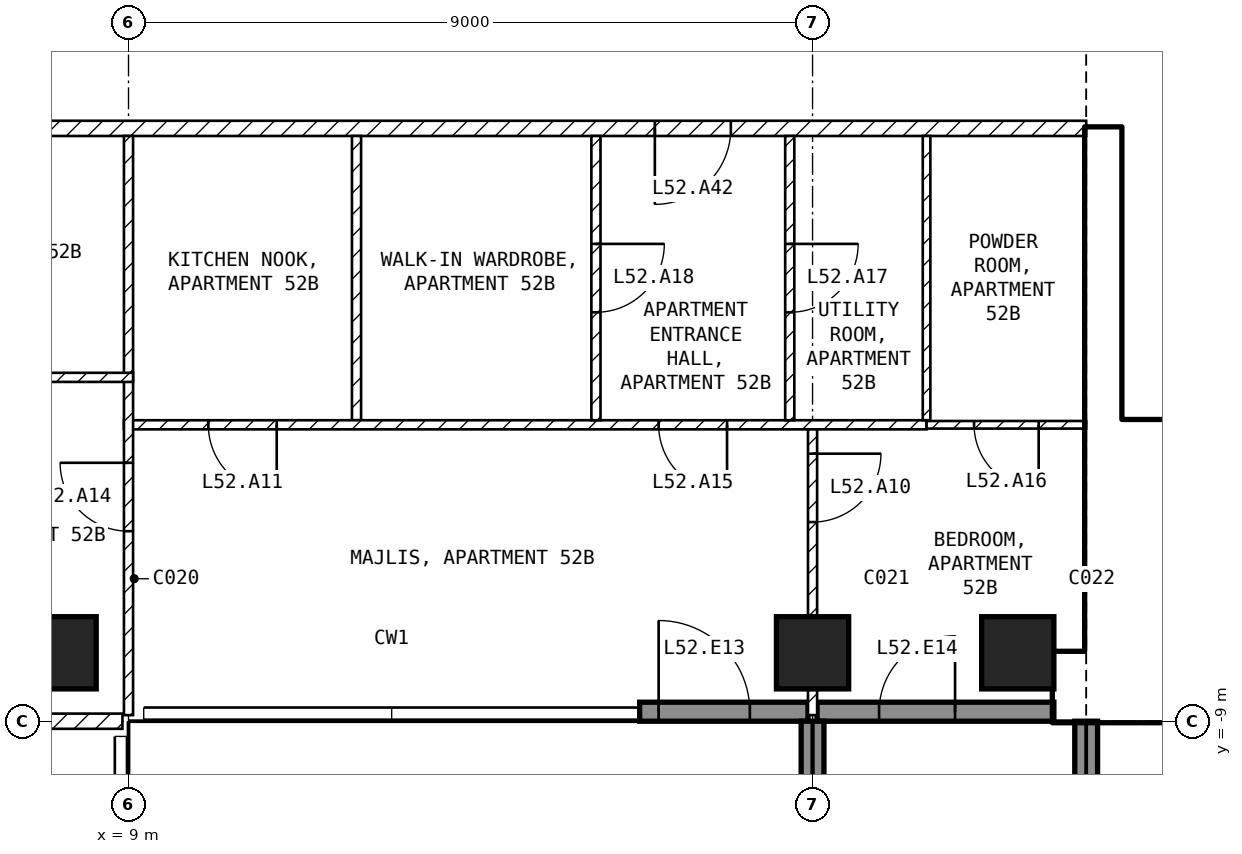
"""IFC4 building model, lengths in metres.
Left out: names, types, materials, properties, quantities, classifications, styles, units other than length and angle.
Written with IfcOpenShell. Run it as: python <this file> out.ifc"""

import sys

from ifc_helpers import new_model, si_unit, direction, frame, frame_2d, origin, origin_2d, place, context, subcontext, project, spatial, rectangle, extrude, element, fill, save


model = new_model("IFC4")
c1 = context("Model", 3, precision=1e-05, world=origin(), true_north=direction((0.0, 1.0)))
c2 = subcontext(c1, "Body", "Model", "MODEL_VIEW")
j1 = project(units=[si_unit("LENGTHUNIT", "METRE"), si_unit("PLANEANGLEUNIT", "RADIAN")], contexts=[c1])
p1 = place(None, origin())
s1 = spatial("IfcSite", under=j1, at=p1, CompositionType="ELEMENT")
p2 = place(p1, origin())
s2 = spatial("IfcBuilding", under=s1, at=p2, CompositionType="ELEMENT")
p3 = place(p2, frame((0.0, 0.0, 208.6)))
s3 = spatial("IfcBuildingStorey", under=s2, at=p3, CompositionType="ELEMENT", Elevation=208.6)
for number, where, z_axis, x_axis in (
    (1, (8.1, -8.1, -0.25), (0.0, 0.0, 1.0), (1.0, 0.0, 0.0)),
    (2, (18.0, -8.1, -0.25), (0.0, 0.0, 1.0), (1.0, 0.0, 0.0)),
    (3, (20.7, -8.1, -0.25), (0.0, 0.0, 1.0), (1.0, 0.0, 0.0)),
):
    element("IfcColumn", number, at=place(p3, frame(where, z_axis=z_axis, x_axis=x_axis)), inside=s3, PredefinedType="COLUMN", context=c2, shape_type="SweptSolid", body=[
        extrude(rectangle(XDim=0.95, YDim=0.95, at=origin_2d()), origin(), (0.0, 0.0, 1.0), 3.5),
    ])
p4 = place(p3, frame((15.725, -8.875, 0.0), z_axis=(0.0, 0.0, 1.0), x_axis=(1.0, 0.0, 0.0)))
e4 = element("IfcWall", 4, at=p4, inside=s3, PredefinedType="SOLIDWALL", context=c2, shape_type="SweptSolid", body=[
    extrude(rectangle(XDim=2.215, YDim=0.25, at=frame_2d((1.107, 0.0))), origin(), (0.0, 0.0, 1.0), 3.25),
])
p5 = place(p4, frame((0.25, 0.0, 0.0)))
e5 = element("IfcOpeningElement", 5, at=p5, cuts=e4, PredefinedType="OPENING", context=c2, shape_type="SweptSolid", body=[
    extrude(rectangle(XDim=1.2, YDim=2.4, at=frame_2d((0.6, 1.2))), frame((0.0, 0.135, 0.0), z_axis=(0.0, -1.0, 0.0), x_axis=(1.0, 0.0, 0.0)), (0.0, 0.0, 1.0), 0.27),
])
p6 = place(p3, frame((18.06, -8.875, 0.0), z_axis=(0.0, 0.0, 1.0), x_axis=(1.0, 0.0, 0.0)))
e6 = element("IfcWall", 6, at=p6, inside=s3, PredefinedType="SOLIDWALL", context=c2, shape_type="SweptSolid", body=[
    extrude(rectangle(XDim=3.115, YDim=0.25, at=frame_2d((1.558, 0.0))), origin(), (0.0, 0.0, 1.0), 3.25),
])
p7 = place(p6, frame((0.815, 0.0, 0.0)))
e7 = element("IfcOpeningElement", 7, at=p7, cuts=e6, PredefinedType="OPENING", context=c2, shape_type="SweptSolid", body=[
    extrude(rectangle(XDim=1.0, YDim=2.4, at=frame_2d((0.5, 1.2))), frame((0.0, 0.135, 0.0), z_axis=(0.0, -1.0, 0.0), x_axis=(1.0, 0.0, 0.0)), (0.0, 0.0, 1.0), 0.27),
])
for number, where, z_axis, x_axis in (
    (8, (18.0, -9.0, 0.0), (0.0, 0.0, 1.0), (0.0, -1.0, 0.0)),
    (9, (21.6, -9.0, 0.0), (0.0, 0.0, 1.0), (0.0, -1.0, 0.0)),
):
    element("IfcWall", number, at=place(p3, frame(where, z_axis=z_axis, x_axis=x_axis)), inside=s3, PredefinedType="SOLIDWALL", context=c2, shape_type="SweptSolid", body=[
        extrude(rectangle(XDim=2.7, YDim=0.3, at=frame_2d((1.35, 0.0))), origin(), (0.0, 0.0, 1.0), 3.25),
    ])
p8 = place(p3, frame((21.175, -8.55, 0.0), z_axis=(0.0, 0.0, 1.0), x_axis=(1.0, 0.0, 0.0)))
e10 = element("IfcWall", 10, at=p8, inside=s3, PredefinedType="SHEAR", context=c2, shape_type="SweptSolid", body=[
    extrude(rectangle(XDim=9.025, YDim=0.9, at=frame_2d((4.512, 0.0))), origin(), (0.0, 0.0, 1.0), 3.25),
])
p9 = place(p3, frame((21.825, -8.1, 0.0), z_axis=(0.0, 0.0, 1.0), x_axis=(0.0, 1.0, 0.0)))
e11 = element("IfcWall", 11, at=p9, inside=s3, PredefinedType="SHEAR", context=c2, shape_type="SweptSolid", body=[
    extrude(rectangle(XDim=6.9, YDim=0.45, at=frame_2d((3.45, 0.0))), origin(), (0.0, 0.0, 1.0), 3.25),
])
p10 = place(p3, frame((22.05, -5.15, 0.0), z_axis=(0.0, 0.0, 1.0), x_axis=(1.0, 0.0, 0.0)))
e12 = element("IfcWall", 12, at=p10, inside=s3, PredefinedType="SOLIDWALL", context=c2, shape_type="SweptSolid", body=[
    extrude(rectangle(XDim=6.3, YDim=0.2, at=frame_2d((3.15, 0.0))), origin(), (0.0, 0.0, 1.0), 3.25),
])
p11 = place(p10, frame((0.2, 0.0, 0.0)))
e13 = element("IfcOpeningElement", 13, at=p11, cuts=e12, PredefinedType="OPENING", context=c2, shape_type="SweptSolid", body=[
    extrude(rectangle(XDim=1.0, YDim=2.1, at=frame_2d((0.5, 1.05))), frame((0.0, 0.11, 0.0), z_axis=(0.0, -1.0, 0.0), x_axis=(1.0, 0.0, 0.0)), (0.0, 0.0, 1.0), 0.22),
])
p12 = place(p3, frame((21.6, -1.2, 0.0), z_axis=(0.0, 0.0, 1.0), x_axis=(-1.0, 0.0, 0.0)))
e14 = element("IfcWall", 14, at=p12, inside=s3, PredefinedType="PARTITIONING", context=c2, shape_type="SweptSolid", body=[
    extrude(rectangle(XDim=17.2, YDim=0.2, at=frame_2d((8.6, 0.0))), origin(), (0.0, 0.0, 1.0), 3.25),
])
p13 = place(p12, frame((4.675, 0.0, 0.0)))
e15 = element("IfcOpeningElement", 15, at=p13, cuts=e14, PredefinedType="OPENING", context=c2, shape_type="SweptSolid", body=[
    extrude(rectangle(XDim=1.0, YDim=2.1, at=frame_2d((0.5, 1.05))), frame((0.0, 0.11, 0.0), z_axis=(0.0, -1.0, 0.0), x_axis=(1.0, 0.0, 0.0)), (0.0, 0.0, 1.0), 0.22),
])
p14 = place(p3, frame((8.92, -9.0, 0.0), z_axis=(0.0, 0.0, 1.0), x_axis=(-1.0, 0.0, 0.0)))
e16 = element("IfcWall", 16, at=p14, inside=s3, PredefinedType="PARTITIONING", context=c2, shape_type="SweptSolid", body=[
    extrude(rectangle(XDim=17.84, YDim=0.2, at=frame_2d((8.92, 0.0))), origin(), (0.0, 0.0, 1.0), 3.25),
])
p15 = place(p14, frame((8.42, 0.0, 0.0)))
e17 = element("IfcOpeningElement", 17, at=p15, cuts=e16, PredefinedType="OPENING", context=c2, shape_type="SweptSolid", body=[
    extrude(rectangle(XDim=1.0, YDim=2.1, at=frame_2d((0.5, 1.05))), frame((0.0, 0.11, 0.0), z_axis=(0.0, -1.0, 0.0), x_axis=(1.0, 0.0, 0.0)), (0.0, 0.0, 1.0), 0.22),
])
p16 = place(p3, frame((12.0, -1.3, 0.0), z_axis=(0.0, 0.0, 1.0), x_axis=(0.0, -1.0, 0.0)))
e18 = element("IfcWall", 18, at=p16, inside=s3, PredefinedType="PARTITIONING", context=c2, shape_type="SweptSolid", body=[
    extrude(rectangle(XDim=3.74, YDim=0.12, at=frame_2d((1.87, 0.0))), origin(), (0.0, 0.0, 1.0), 3.25),
])
p17 = place(p3, frame((19.5, -5.1, 0.0), z_axis=(0.0, 0.0, 1.0), x_axis=(-1.0, 0.0, 0.0)))
e19 = element("IfcWall", 19, at=p17, inside=s3, PredefinedType="PARTITIONING", context=c2, shape_type="SweptSolid", body=[
    extrude(rectangle(XDim=10.56, YDim=0.12, at=frame_2d((5.28, 0.0))), origin(), (0.0, 0.0, 1.0), 3.25),
])
p18 = place(p17, frame((8.55, 0.0, 0.0)))
e20 = element("IfcOpeningElement", 20, at=p18, cuts=e19, PredefinedType="OPENING", context=c2, shape_type="SweptSolid", body=[
    extrude(rectangle(XDim=0.9, YDim=2.1, at=frame_2d((0.45, 1.05))), frame((0.0, 0.07, 0.0), z_axis=(0.0, -1.0, 0.0), x_axis=(1.0, 0.0, 0.0)), (0.0, 0.0, 1.0), 0.14),
])
p19 = place(p17, frame((2.625, 0.0, 0.0)))
e21 = element("IfcOpeningElement", 21, at=p19, cuts=e19, PredefinedType="OPENING", context=c2, shape_type="SweptSolid", body=[
    extrude(rectangle(XDim=0.9, YDim=2.1, at=frame_2d((0.45, 1.05))), frame((0.0, 0.07, 0.0), z_axis=(0.0, -1.0, 0.0), x_axis=(1.0, 0.0, 0.0)), (0.0, 0.0, 1.0), 0.14),
])
p20 = place(p3, frame((9.0, -8.92, 0.0), z_axis=(0.0, 0.0, 1.0), x_axis=(0.0, 1.0, 0.0)))
e22 = element("IfcWall", 22, at=p20, inside=s3, PredefinedType="PARTITIONING", context=c2, shape_type="SweptSolid", body=[
    extrude(rectangle(XDim=7.62, YDim=0.12, at=frame_2d((3.81, 0.0))), origin(), (0.0, 0.0, 1.0), 3.25),
])
p21 = place(p20, frame((2.42, 0.0, 0.0)))
e23 = element("IfcOpeningElement", 23, at=p21, cuts=e22, PredefinedType="OPENING", context=c2, shape_type="SweptSolid", body=[
    extrude(rectangle(XDim=0.9, YDim=2.1, at=frame_2d((0.45, 1.05))), frame((0.0, 0.07, 0.0), z_axis=(0.0, -1.0, 0.0), x_axis=(1.0, 0.0, 0.0)), (0.0, 0.0, 1.0), 0.14),
])
p22 = place(p3, frame((15.15, -1.3, 0.0), z_axis=(0.0, 0.0, 1.0), x_axis=(0.0, -1.0, 0.0)))
e24 = element("IfcWall", 24, at=p22, inside=s3, PredefinedType="PARTITIONING", context=c2, shape_type="SweptSolid", body=[
    extrude(rectangle(XDim=3.74, YDim=0.12, at=frame_2d((1.87, 0.0))), origin(), (0.0, 0.0, 1.0), 3.25),
])
p23 = place(p22, frame((1.42, 0.0, 0.0)))
e25 = element("IfcOpeningElement", 25, at=p23, cuts=e24, PredefinedType="OPENING", context=c2, shape_type="SweptSolid", body=[
    extrude(rectangle(XDim=0.9, YDim=2.1, at=frame_2d((0.45, 1.05))), frame((0.0, 0.07, 0.0), z_axis=(0.0, -1.0, 0.0), x_axis=(1.0, 0.0, 0.0)), (0.0, 0.0, 1.0), 0.14),
])
p24 = place(p3, frame((17.7, -1.3, 0.0), z_axis=(0.0, 0.0, 1.0), x_axis=(0.0, -1.0, 0.0)))
e26 = element("IfcWall", 26, at=p24, inside=s3, PredefinedType="PARTITIONING", context=c2, shape_type="SweptSolid", body=[
    extrude(rectangle(XDim=3.74, YDim=0.12, at=frame_2d((1.87, 0.0))), origin(), (0.0, 0.0, 1.0), 3.25),
])
p25 = place(p24, frame((1.42, 0.0, 0.0)))
e27 = element("IfcOpeningElement", 27, at=p25, cuts=e26, PredefinedType="OPENING", context=c2, shape_type="SweptSolid", body=[
    extrude(rectangle(XDim=0.9, YDim=2.1, at=frame_2d((0.45, 1.05))), frame((0.0, 0.07, 0.0), z_axis=(0.0, -1.0, 0.0), x_axis=(1.0, 0.0, 0.0)), (0.0, 0.0, 1.0), 0.14),
])
p26 = place(p3, frame((19.5, -1.3, 0.0), z_axis=(0.0, 0.0, 1.0), x_axis=(0.0, -1.0, 0.0)))
e28 = element("IfcWall", 28, at=p26, inside=s3, PredefinedType="PARTITIONING", context=c2, shape_type="SweptSolid", body=[
    extrude(rectangle(XDim=3.74, YDim=0.1, at=frame_2d((1.87, 0.0))), origin(), (0.0, 0.0, 1.0), 3.25),
])
p27 = place(p3, frame((21.6, -5.1, 0.0), z_axis=(0.0, 0.0, 1.0), x_axis=(-1.0, 0.0, 0.0)))
e29 = element("IfcWall", 29, at=p27, inside=s3, PredefinedType="PARTITIONING", context=c2, shape_type="SweptSolid", body=[
    extrude(rectangle(XDim=2.1, YDim=0.1, at=frame_2d((1.05, 0.0))), origin(), (0.0, 0.0, 1.0), 3.25),
])
p28 = place(p27, frame((0.625, 0.0, 0.0)))
e30 = element("IfcOpeningElement", 30, at=p28, cuts=e29, PredefinedType="OPENING", context=c2, shape_type="SweptSolid", body=[
    extrude(rectangle(XDim=0.85, YDim=2.1, at=frame_2d((0.425, 1.05))), frame((0.0, 0.06, 0.0), z_axis=(0.0, -1.0, 0.0), x_axis=(1.0, 0.0, 0.0)), (0.0, 0.0, 1.0), 0.12),
])
p29 = place(p3, frame((18.0, -5.16, 0.0), z_axis=(0.0, 0.0, 1.0), x_axis=(0.0, -1.0, 0.0)))
e31 = element("IfcWall", 31, at=p29, inside=s3, PredefinedType="PARTITIONING", context=c2, shape_type="SweptSolid", body=[
    extrude(rectangle(XDim=3.76, YDim=0.12, at=frame_2d((1.88, 0.0))), origin(), (0.0, 0.0, 1.0), 2.48),
])
p30 = place(p29, frame((0.32, 0.0, 0.0)))
e32 = element("IfcOpeningElement", 32, at=p30, cuts=e31, PredefinedType="OPENING", context=c2, shape_type="SweptSolid", body=[
    extrude(rectangle(XDim=0.9, YDim=2.1, at=frame_2d((0.45, 1.05))), frame((0.0, 0.07, 0.0), z_axis=(0.0, -1.0, 0.0), x_axis=(1.0, 0.0, 0.0)), (0.0, 0.0, 1.0), 0.14),
])
p31 = place(p3, frame((9.06, -4.476, 0.0), z_axis=(0.0, 0.0, 1.0), x_axis=(-1.0, 0.0, 0.0)))
e33 = element("IfcWall", 33, at=p31, inside=s3, PredefinedType="PARTITIONING", context=c2, shape_type="SweptSolid", body=[
    extrude(rectangle(XDim=4.66, YDim=0.12, at=frame_2d((2.33, 0.0))), origin(), (0.0, 0.0, 1.0), 3.25),
])
p32 = place(p31, frame((1.86, 0.0, 0.0)))
e34 = element("IfcOpeningElement", 34, at=p32, cuts=e33, PredefinedType="OPENING", context=c2, shape_type="SweptSolid", body=[
    extrude(rectangle(XDim=0.9, YDim=2.1, at=frame_2d((0.45, 1.05))), frame((0.0, 0.07, 0.0), z_axis=(0.0, -1.0, 0.0), x_axis=(1.0, 0.0, 0.0)), (0.0, 0.0, 1.0), 0.14),
])
p33 = place(p5, origin())
e35 = element("IfcDoor", 35, at=p33, inside=s3, OperationType="SINGLE_SWING_LEFT", PredefinedType="DOOR", context=c2, shape_type="SweptSolid", body=[
    extrude(rectangle(XDim=1.2, YDim=2.4, at=frame_2d((0.6, 1.2))), frame((0.0, 0.025, 0.0), z_axis=(0.0, -1.0, 0.0), x_axis=(1.0, 0.0, 0.0)), (0.0, 0.0, 1.0), 0.05),
])
fill(e5, e35)
p34 = place(p7, origin())
e36 = element("IfcDoor", 36, at=p34, inside=s3, OperationType="SINGLE_SWING_RIGHT", PredefinedType="DOOR", context=c2, shape_type="SweptSolid", body=[
    extrude(rectangle(XDim=1.0, YDim=2.4, at=frame_2d((0.5, 1.2))), frame((0.0, 0.025, 0.0), z_axis=(0.0, -1.0, 0.0), x_axis=(1.0, 0.0, 0.0)), (0.0, 0.0, 1.0), 0.05),
])
fill(e7, e36)
p35 = place(p11, origin())
e37 = element("IfcDoor", 37, at=p35, inside=s3, OperationType="SINGLE_SWING_LEFT", PredefinedType="DOOR", context=c2, shape_type="SweptSolid", body=[
    extrude(rectangle(XDim=1.0, YDim=2.1, at=frame_2d((0.5, 1.05))), frame((0.0, 0.025, 0.0), z_axis=(0.0, -1.0, 0.0), x_axis=(1.0, 0.0, 0.0)), (0.0, 0.0, 1.0), 0.05),
])
fill(e13, e37)
p36 = place(p30, origin())
e38 = element("IfcDoor", 38, at=p36, inside=s3, OperationType="SINGLE_SWING_LEFT", PredefinedType="DOOR", context=c2, shape_type="SweptSolid", body=[
    extrude(rectangle(XDim=0.9, YDim=2.1, at=frame_2d((0.45, 1.05))), frame((0.0, 0.025, 0.0), z_axis=(0.0, -1.0, 0.0), x_axis=(1.0, 0.0, 0.0)), (0.0, 0.0, 1.0), 0.05),
])
fill(e32, e38)
p37 = place(p18, origin())
e39 = element("IfcDoor", 39, at=p37, inside=s3, OperationType="SINGLE_SWING_LEFT", PredefinedType="DOOR", context=c2, shape_type="SweptSolid", body=[
    extrude(rectangle(XDim=0.9, YDim=2.1, at=frame_2d((0.45, 1.05))), frame((0.0, 0.025, 0.0), z_axis=(0.0, -1.0, 0.0), x_axis=(1.0, 0.0, 0.0)), (0.0, 0.0, 1.0), 0.05),
])
fill(e20, e39)
p38 = place(p21, origin())
e40 = element("IfcDoor", 40, at=p38, inside=s3, OperationType="SINGLE_SWING_RIGHT", PredefinedType="DOOR", context=c2, shape_type="SweptSolid", body=[
    extrude(rectangle(XDim=0.9, YDim=2.1, at=frame_2d((0.45, 1.05))), frame((0.0, 0.025, 0.0), z_axis=(0.0, -1.0, 0.0), x_axis=(1.0, 0.0, 0.0)), (0.0, 0.0, 1.0), 0.05),
])
fill(e23, e40)
p39 = place(p19, origin())
e41 = element("IfcDoor", 41, at=p39, inside=s3, OperationType="SINGLE_SWING_LEFT", PredefinedType="DOOR", context=c2, shape_type="SweptSolid", body=[
    extrude(rectangle(XDim=0.9, YDim=2.1, at=frame_2d((0.45, 1.05))), frame((0.0, 0.025, 0.0), z_axis=(0.0, -1.0, 0.0), x_axis=(1.0, 0.0, 0.0)), (0.0, 0.0, 1.0), 0.05),
])
fill(e21, e41)
p40 = place(p28, origin())
e42 = element("IfcDoor", 42, at=p40, inside=s3, OperationType="SINGLE_SWING_LEFT", PredefinedType="DOOR", context=c2, shape_type="SweptSolid", body=[
    extrude(rectangle(XDim=0.85, YDim=2.1, at=frame_2d((0.425, 1.05))), frame((0.0, 0.025, 0.0), z_axis=(0.0, -1.0, 0.0), x_axis=(1.0, 0.0, 0.0)), (0.0, 0.0, 1.0), 0.05),
])
fill(e30, e42)
p41 = place(p25, origin())
e43 = element("IfcDoor", 43, at=p41, inside=s3, OperationType="SINGLE_SWING_LEFT", PredefinedType="DOOR", context=c2, shape_type="SweptSolid", body=[
    extrude(rectangle(XDim=0.9, YDim=2.1, at=frame_2d((0.45, 1.05))), frame((0.0, 0.025, 0.0), z_axis=(0.0, -1.0, 0.0), x_axis=(1.0, 0.0, 0.0)), (0.0, 0.0, 1.0), 0.05),
])
fill(e27, e43)
p42 = place(p23, origin())
e44 = element("IfcDoor", 44, at=p42, inside=s3, OperationType="SINGLE_SWING_LEFT", PredefinedType="DOOR", context=c2, shape_type="SweptSolid", body=[
    extrude(rectangle(XDim=0.9, YDim=2.1, at=frame_2d((0.45, 1.05))), frame((0.0, 0.025, 0.0), z_axis=(0.0, -1.0, 0.0), x_axis=(1.0, 0.0, 0.0)), (0.0, 0.0, 1.0), 0.05),
])
fill(e25, e44)
p43 = place(p13, origin())
e45 = element("IfcDoor", 45, at=p43, inside=s3, OperationType="SINGLE_SWING_RIGHT", PredefinedType="DOOR", context=c2, shape_type="SweptSolid", body=[
    extrude(rectangle(XDim=1.0, YDim=2.1, at=frame_2d((0.5, 1.05))), frame((0.0, 0.025, 0.0), z_axis=(0.0, -1.0, 0.0), x_axis=(1.0, 0.0, 0.0)), (0.0, 0.0, 1.0), 0.05),
])
fill(e15, e45)
save(model, sys.argv[1])
